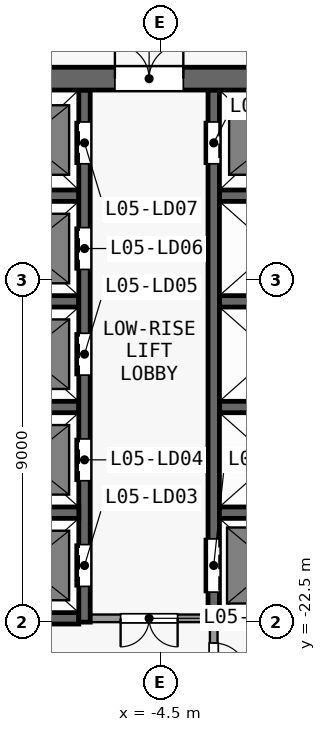
"""IFC4 building model, lengths in metres.
Left out: names, types, materials, properties, quantities, classifications, styles, units other than length and angle.
Written with IfcOpenShell. Run it as: python <this file> out.ifc"""

import sys

from ifc_helpers import new_model, si_unit, direction, frame, frame_2d, origin, place, context, subcontext, project, spatial, rectangle, extrude, element, fill, save


model = new_model("IFC4")
c1 = context("Model", 3, precision=1e-05, world=origin(), true_north=direction((0.0, 1.0)))
c2 = subcontext(c1, "Body", "Model", "MODEL_VIEW")
j1 = project(units=[si_unit("LENGTHUNIT", "METRE"), si_unit("PLANEANGLEUNIT", "RADIAN")], contexts=[c1])
p1 = place(None, origin())
s1 = spatial("IfcSite", under=j1, at=p1, CompositionType="ELEMENT")
p2 = place(p1, origin())
s2 = spatial("IfcBuilding", under=s1, at=p2, CompositionType="ELEMENT")
p3 = place(p2, frame((0.0, 0.0, 28.0)))
s3 = spatial("IfcBuildingStorey", under=s2, at=p3, CompositionType="ELEMENT", Elevation=28.0)
p4 = place(p3, frame((-13.5, -8.2, 0.0), z_axis=(0.0, 0.0, 1.0), x_axis=(1.0, 0.0, 0.0)))
e1 = element("IfcWall", 1, at=p4, inside=s3, PredefinedType="SHEAR", context=c2, shape_type="SweptSolid", body=[
    extrude(rectangle(XDim=27.0, YDim=0.6, at=frame_2d((13.5, 0.0))), origin(), (0.0, 0.0, 1.0), 4.1),
])
p5 = place(p4, frame((7.8, 0.0, 0.0)))
e2 = element("IfcOpeningElement", 2, at=p5, cuts=e1, PredefinedType="OPENING", context=c2, shape_type="SweptSolid", body=[
    extrude(rectangle(XDim=1.8, YDim=2.1, at=frame_2d((0.9, 1.05))), frame((0.0, 0.31, 0.0), z_axis=(0.0, -1.0, 0.0), x_axis=(1.0, 0.0, 0.0)), (0.0, 0.0, 1.0), 0.62),
])
p6 = place(p4, frame((17.4, 0.0, 0.0)))
e3 = element("IfcOpeningElement", 3, at=p6, cuts=e1, PredefinedType="OPENING", context=c2, shape_type="SweptSolid", body=[
    extrude(rectangle(XDim=1.8, YDim=2.1, at=frame_2d((0.9, 1.05))), frame((0.0, 0.31, 0.0), z_axis=(0.0, -1.0, 0.0), x_axis=(1.0, 0.0, 0.0)), (0.0, 0.0, 1.0), 0.62),
])
p7 = place(p4, frame((2.725, 0.0, 0.0)))
e4 = element("IfcOpeningElement", 4, at=p7, cuts=e1, PredefinedType="OPENING", context=c2, shape_type="SweptSolid", body=[
    extrude(rectangle(XDim=0.9, YDim=2.1, at=frame_2d((0.45, 1.05))), frame((0.0, 0.31, 0.0), z_axis=(0.0, -1.0, 0.0), x_axis=(1.0, 0.0, 0.0)), (0.0, 0.0, 1.0), 0.62),
])
p8 = place(p4, frame((23.375, 0.0, 0.0)))
e5 = element("IfcOpeningElement", 5, at=p8, cuts=e1, PredefinedType="OPENING", context=c2, shape_type="SweptSolid", body=[
    extrude(rectangle(XDim=0.9, YDim=2.1, at=frame_2d((0.45, 1.05))), frame((0.0, 0.31, 0.0), z_axis=(0.0, -1.0, 0.0), x_axis=(1.0, 0.0, 0.0)), (0.0, 0.0, 1.0), 0.62),
])
p9 = place(p3, frame((-9.45, -22.4, 0.0), z_axis=(0.0, 0.0, 1.0), x_axis=(1.0, 0.0, 0.0)))
e6 = element("IfcWall", 6, at=p9, inside=s3, PredefinedType="SHEAR", context=c2, shape_type="SweptSolid", body=[
    extrude(rectangle(XDim=2.8, YDim=0.3, at=frame_2d((1.4, 0.0))), origin(), (0.0, 0.0, 1.0), 4.1),
])
p10 = place(p3, frame((-3.25, -22.4, 0.0), z_axis=(0.0, 0.0, 1.0), x_axis=(-1.0, 0.0, 0.0)))
e7 = element("IfcWall", 7, at=p10, inside=s3, PredefinedType="PARTITIONING", context=c2, shape_type="SweptSolid", body=[
    extrude(rectangle(XDim=3.1, YDim=0.2, at=frame_2d((1.55, 0.0))), origin(), (0.0, 0.0, 1.0), 4.1),
])
p11 = place(p10, frame((0.8, 0.0, 0.0)))
e8 = element("IfcOpeningElement", 8, at=p11, cuts=e7, PredefinedType="OPENING", context=c2, shape_type="SweptSolid", body=[
    extrude(rectangle(XDim=1.5, YDim=2.1, at=frame_2d((0.75, 1.05))), frame((0.0, 0.11, 0.0), z_axis=(0.0, -1.0, 0.0), x_axis=(1.0, 0.0, 0.0)), (0.0, 0.0, 1.0), 0.22),
])
p12 = place(p3, frame((-2.95, -22.4, 0.0), z_axis=(0.0, 0.0, 1.0), x_axis=(1.0, 0.0, 0.0)))
e9 = element("IfcWall", 9, at=p12, inside=s3, PredefinedType="SHEAR", context=c2, shape_type="SweptSolid", body=[
    extrude(rectangle(XDim=6.2, YDim=0.3, at=frame_2d((3.1, 0.0))), origin(), (0.0, 0.0, 1.0), 4.1),
])
for number, where, z_axis, x_axis in (
    (10, (-9.45, -19.62, 0.0), (0.0, 0.0, 1.0), (1.0, 0.0, 0.0)),
    (11, (-2.95, -19.62, 0.0), (0.0, 0.0, 1.0), (1.0, 0.0, 0.0)),
    (12, (-9.45, -16.84, 0.0), (0.0, 0.0, 1.0), (1.0, 0.0, 0.0)),
    (13, (-2.95, -16.84, 0.0), (0.0, 0.0, 1.0), (1.0, 0.0, 0.0)),
    (14, (-9.45, -14.06, 0.0), (0.0, 0.0, 1.0), (1.0, 0.0, 0.0)),
    (15, (-2.95, -14.06, 0.0), (0.0, 0.0, 1.0), (1.0, 0.0, 0.0)),
    (16, (-9.45, -11.28, 0.0), (0.0, 0.0, 1.0), (1.0, 0.0, 0.0)),
    (17, (-2.95, -11.28, 0.0), (0.0, 0.0, 1.0), (1.0, 0.0, 0.0)),
):
    element("IfcWall", number, at=place(p3, frame(where, z_axis=z_axis, x_axis=x_axis)), inside=s3, PredefinedType="SHEAR", context=c2, shape_type="SweptSolid", body=[
        extrude(rectangle(XDim=2.8, YDim=0.3, at=frame_2d((1.4, 0.0))), origin(), (0.0, 0.0, 1.0), 4.1),
    ])
p13 = place(p3, frame((-6.5, -22.5, 0.0), z_axis=(0.0, 0.0, 1.0), x_axis=(0.0, 1.0, 0.0)))
e18 = element("IfcWall", 18, at=p13, inside=s3, PredefinedType="SHEAR", context=c2, shape_type="SweptSolid", body=[
    extrude(rectangle(XDim=14.0, YDim=0.3, at=frame_2d((7.0, 0.0))), origin(), (0.0, 0.0, 1.0), 4.1),
])
p14 = place(p13, frame((0.94, 0.0, 0.0)))
e19 = element("IfcOpeningElement", 19, at=p14, cuts=e18, PredefinedType="OPENING", context=c2, shape_type="SweptSolid", body=[
    extrude(rectangle(XDim=1.1, YDim=2.1, at=frame_2d((0.55, 1.05))), frame((0.0, 0.16, 0.0), z_axis=(0.0, -1.0, 0.0), x_axis=(1.0, 0.0, 0.0)), (0.0, 0.0, 1.0), 0.32),
])
p15 = place(p13, frame((3.72, 0.0, 0.0)))
e20 = element("IfcOpeningElement", 20, at=p15, cuts=e18, PredefinedType="OPENING", context=c2, shape_type="SweptSolid", body=[
    extrude(rectangle(XDim=1.1, YDim=2.1, at=frame_2d((0.55, 1.05))), frame((0.0, 0.16, 0.0), z_axis=(0.0, -1.0, 0.0), x_axis=(1.0, 0.0, 0.0)), (0.0, 0.0, 1.0), 0.32),
])
p16 = place(p13, frame((6.5, 0.0, 0.0)))
e21 = element("IfcOpeningElement", 21, at=p16, cuts=e18, PredefinedType="OPENING", context=c2, shape_type="SweptSolid", body=[
    extrude(rectangle(XDim=1.1, YDim=2.1, at=frame_2d((0.55, 1.05))), frame((0.0, 0.16, 0.0), z_axis=(0.0, -1.0, 0.0), x_axis=(1.0, 0.0, 0.0)), (0.0, 0.0, 1.0), 0.32),
])
p17 = place(p13, frame((9.28, 0.0, 0.0)))
e22 = element("IfcOpeningElement", 22, at=p17, cuts=e18, PredefinedType="OPENING", context=c2, shape_type="SweptSolid", body=[
    extrude(rectangle(XDim=1.1, YDim=2.1, at=frame_2d((0.55, 1.05))), frame((0.0, 0.16, 0.0), z_axis=(0.0, -1.0, 0.0), x_axis=(1.0, 0.0, 0.0)), (0.0, 0.0, 1.0), 0.32),
])
p18 = place(p13, frame((12.06, 0.0, 0.0)))
e23 = element("IfcOpeningElement", 23, at=p18, cuts=e18, PredefinedType="OPENING", context=c2, shape_type="SweptSolid", body=[
    extrude(rectangle(XDim=1.1, YDim=2.1, at=frame_2d((0.55, 1.05))), frame((0.0, 0.16, 0.0), z_axis=(0.0, -1.0, 0.0), x_axis=(1.0, 0.0, 0.0)), (0.0, 0.0, 1.0), 0.32),
])
p19 = place(p3, frame((-3.1, -22.55, 0.0), z_axis=(0.0, 0.0, 1.0), x_axis=(0.0, -1.0, 0.0)))
e24 = element("IfcWall", 24, at=p19, inside=s3, PredefinedType="PARTITIONING", context=c2, shape_type="SweptSolid", body=[
    extrude(rectangle(XDim=2.05, YDim=0.2, at=frame_2d((1.025, 0.0))), origin(), (0.0, 0.0, 1.0), 4.1),
])
p20 = place(p19, frame((0.5, 0.0, 0.0)))
e25 = element("IfcOpeningElement", 25, at=p20, cuts=e24, PredefinedType="OPENING", context=c2, shape_type="SweptSolid", body=[
    extrude(rectangle(XDim=0.9, YDim=2.1, at=frame_2d((0.45, 1.05))), frame((0.0, 0.11, 0.0), z_axis=(0.0, -1.0, 0.0), x_axis=(1.0, 0.0, 0.0)), (0.0, 0.0, 1.0), 0.22),
])
p21 = place(p3, frame((-3.1, -22.55, 0.0), z_axis=(0.0, 0.0, 1.0), x_axis=(0.0, 1.0, 0.0)))
e26 = element("IfcWall", 26, at=p21, inside=s3, PredefinedType="SHEAR", context=c2, shape_type="SweptSolid", body=[
    extrude(rectangle(XDim=14.05, YDim=0.3, at=frame_2d((7.025, 0.0))), origin(), (0.0, 0.0, 1.0), 4.1),
])
p22 = place(p21, frame((12.11, 0.0, 0.0)))
e27 = element("IfcOpeningElement", 27, at=p22, cuts=e26, PredefinedType="OPENING", context=c2, shape_type="SweptSolid", body=[
    extrude(rectangle(XDim=1.1, YDim=2.1, at=frame_2d((0.55, 1.05))), frame((0.0, 0.16, 0.0), z_axis=(0.0, -1.0, 0.0), x_axis=(1.0, 0.0, 0.0)), (0.0, 0.0, 1.0), 0.32),
])
p23 = place(p21, frame((0.84, 0.0, 0.0)))
e28 = element("IfcOpeningElement", 28, at=p23, cuts=e26, PredefinedType="OPENING", context=c2, shape_type="SweptSolid", body=[
    extrude(rectangle(XDim=1.4, YDim=2.1, at=frame_2d((0.7, 1.05))), frame((0.0, 0.16, 0.0), z_axis=(0.0, -1.0, 0.0), x_axis=(1.0, 0.0, 0.0)), (0.0, 0.0, 1.0), 0.32),
])
p24 = place(p14, origin())
e29 = element("IfcDoor", 29, at=p24, inside=s3, OperationType="DOUBLE_DOOR_SLIDING", PredefinedType="DOOR", context=c2, shape_type="SweptSolid", body=[
    extrude(rectangle(XDim=1.1, YDim=2.1, at=frame_2d((0.55, 1.05))), frame((0.0, 0.025, 0.0), z_axis=(0.0, -1.0, 0.0), x_axis=(1.0, 0.0, 0.0)), (0.0, 0.0, 1.0), 0.05),
])
fill(e19, e29)
p25 = place(p15, origin())
e30 = element("IfcDoor", 30, at=p25, inside=s3, OperationType="DOUBLE_DOOR_SLIDING", PredefinedType="DOOR", context=c2, shape_type="SweptSolid", body=[
    extrude(rectangle(XDim=1.1, YDim=2.1, at=frame_2d((0.55, 1.05))), frame((0.0, 0.025, 0.0), z_axis=(0.0, -1.0, 0.0), x_axis=(1.0, 0.0, 0.0)), (0.0, 0.0, 1.0), 0.05),
])
fill(e20, e30)
p26 = place(p16, origin())
e31 = element("IfcDoor", 31, at=p26, inside=s3, OperationType="DOUBLE_DOOR_SLIDING", PredefinedType="DOOR", context=c2, shape_type="SweptSolid", body=[
    extrude(rectangle(XDim=1.1, YDim=2.1, at=frame_2d((0.55, 1.05))), frame((0.0, 0.025, 0.0), z_axis=(0.0, -1.0, 0.0), x_axis=(1.0, 0.0, 0.0)), (0.0, 0.0, 1.0), 0.05),
])
fill(e21, e31)
p27 = place(p17, origin())
e32 = element("IfcDoor", 32, at=p27, inside=s3, OperationType="DOUBLE_DOOR_SLIDING", PredefinedType="DOOR", context=c2, shape_type="SweptSolid", body=[
    extrude(rectangle(XDim=1.1, YDim=2.1, at=frame_2d((0.55, 1.05))), frame((0.0, 0.025, 0.0), z_axis=(0.0, -1.0, 0.0), x_axis=(1.0, 0.0, 0.0)), (0.0, 0.0, 1.0), 0.05),
])
fill(e22, e32)
p28 = place(p18, origin())
e33 = element("IfcDoor", 33, at=p28, inside=s3, OperationType="DOUBLE_DOOR_SLIDING", PredefinedType="DOOR", context=c2, shape_type="SweptSolid", body=[
    extrude(rectangle(XDim=1.1, YDim=2.1, at=frame_2d((0.55, 1.05))), frame((0.0, 0.025, 0.0), z_axis=(0.0, -1.0, 0.0), x_axis=(1.0, 0.0, 0.0)), (0.0, 0.0, 1.0), 0.05),
])
fill(e23, e33)
p29 = place(p22, origin())
e34 = element("IfcDoor", 34, at=p29, inside=s3, OperationType="DOUBLE_DOOR_SLIDING", PredefinedType="DOOR", context=c2, shape_type="SweptSolid", body=[
    extrude(rectangle(XDim=1.1, YDim=2.1, at=frame_2d((0.55, 1.05))), frame((0.0, 0.025, 0.0), z_axis=(0.0, -1.0, 0.0), x_axis=(1.0, 0.0, 0.0)), (0.0, 0.0, 1.0), 0.05),
])
fill(e27, e34)
p30 = place(p23, origin())
e35 = element("IfcDoor", 35, at=p30, inside=s3, OperationType="DOUBLE_DOOR_SLIDING", PredefinedType="DOOR", context=c2, shape_type="SweptSolid", body=[
    extrude(rectangle(XDim=1.4, YDim=2.1, at=frame_2d((0.7, 1.05))), frame((0.0, 0.025, 0.0), z_axis=(0.0, -1.0, 0.0), x_axis=(1.0, 0.0, 0.0)), (0.0, 0.0, 1.0), 0.05),
])
fill(e28, e35)
p31 = place(p11, origin())
e36 = element("IfcDoor", 36, at=p31, inside=s3, OperationType="DOUBLE_DOOR_SINGLE_SWING", PredefinedType="DOOR", context=c2, shape_type="SweptSolid", body=[
    extrude(rectangle(XDim=1.5, YDim=2.1, at=frame_2d((0.75, 1.05))), frame((0.0, 0.025, 0.0), z_axis=(0.0, -1.0, 0.0), x_axis=(1.0, 0.0, 0.0)), (0.0, 0.0, 1.0), 0.05),
])
fill(e8, e36)
p32 = place(p5, origin())
e37 = element("IfcDoor", 37, at=p32, inside=s3, OperationType="DOUBLE_DOOR_SINGLE_SWING", PredefinedType="DOOR", context=c2, shape_type="SweptSolid", body=[
    extrude(rectangle(XDim=1.8, YDim=2.1, at=frame_2d((0.9, 1.05))), frame((0.0, 0.025, 0.0), z_axis=(0.0, -1.0, 0.0), x_axis=(1.0, 0.0, 0.0)), (0.0, 0.0, 1.0), 0.05),
])
fill(e2, e37)
p33 = place(p20, origin())
e38 = element("IfcDoor", 38, at=p33, inside=s3, OperationType="SINGLE_SWING_RIGHT", PredefinedType="DOOR", context=c2, shape_type="SweptSolid", body=[
    extrude(rectangle(XDim=0.9, YDim=2.1, at=frame_2d((0.45, 1.05))), frame((0.0, 0.025, 0.0), z_axis=(0.0, -1.0, 0.0), x_axis=(1.0, 0.0, 0.0)), (0.0, 0.0, 1.0), 0.05),
])
fill(e25, e38)
save(model, sys.argv[1])
